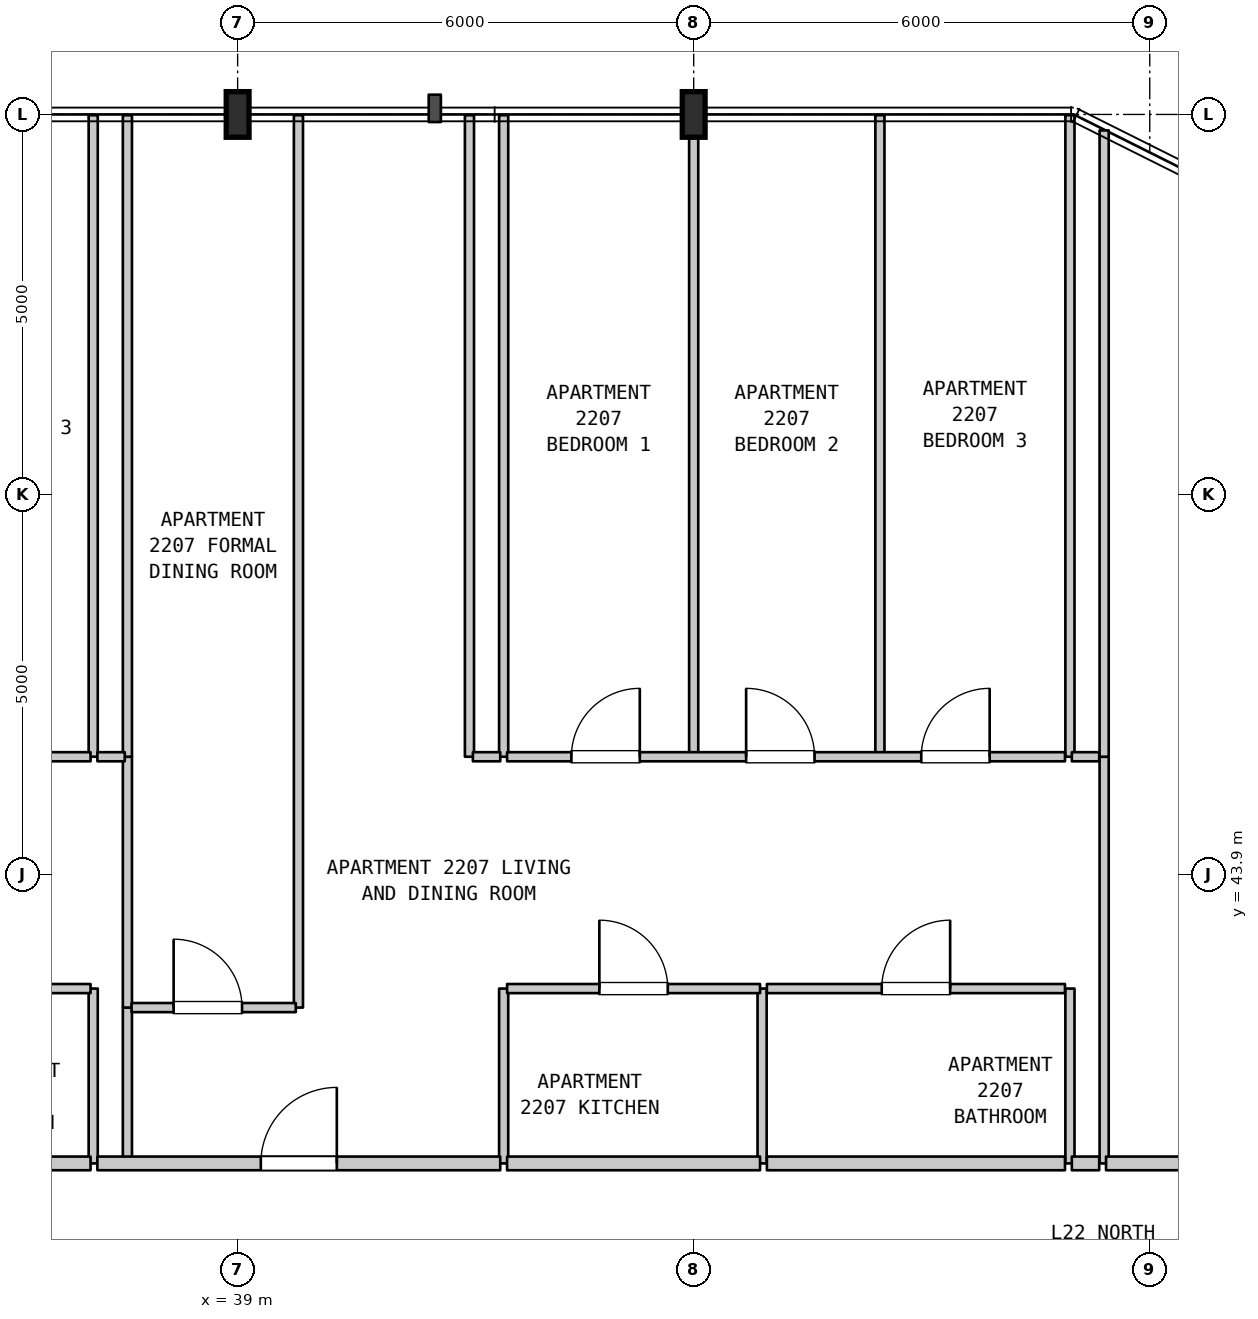
"""IFC4 building model, lengths in metres.
Left out: names, types, materials, properties, quantities, classifications, styles, units other than length and angle.
Written with IfcOpenShell. Run it as: python <this file> out.ifc"""

import sys

from ifc_helpers import new_model, si_unit, direction, frame, frame_2d, origin, origin_2d, place, context, subcontext, project, spatial, rectangle, i_section, extrude, element, fill, save


model = new_model("IFC4")
c1 = context("Model", 3, precision=1e-05, world=origin(), true_north=direction((0.0, 1.0)))
c2 = subcontext(c1, "Body", "Model", "MODEL_VIEW")
j1 = project(units=[si_unit("LENGTHUNIT", "METRE"), si_unit("PLANEANGLEUNIT", "RADIAN")], contexts=[c1])
p1 = place(None, origin())
s1 = spatial("IfcSite", under=j1, at=p1, CompositionType="ELEMENT")
p2 = place(p1, origin())
s2 = spatial("IfcBuilding", under=s1, at=p2, CompositionType="ELEMENT")
p3 = place(p2, frame((0.0, 0.0, 94.6)))
s3 = spatial("IfcBuildingStorey", under=s2, at=p3, CompositionType="ELEMENT", Elevation=94.6)
for number, where, z_axis, x_axis in (
    (1, (39.0, 53.9, 0.0), (0.0, 0.0, 1.0), (1.0, 0.0, 0.0)),
    (2, (45.0, 53.9, 0.0), (0.0, 0.0, 1.0), (1.0, 0.0, 0.0)),
):
    element("IfcColumn", number, at=place(p3, frame(where, z_axis=z_axis, x_axis=x_axis)), inside=s3, PredefinedType="COLUMN", context=c2, shape_type="SweptSolid", body=[
        extrude(i_section(OverallWidth=0.3, OverallDepth=0.6, WebThickness=0.015, FlangeThickness=0.03, FilletRadius=0.027, at=origin_2d()), origin(), (0.0, 0.0, 1.0), 3.7),
    ])
p4 = place(p3, frame((37.1, 40.1, 0.0), z_axis=(0.0, 0.0, 1.0), x_axis=(0.0, 1.0, 0.0)))
e3 = element("IfcWall", 3, at=p4, inside=s3, PredefinedType="PARTITIONING", context=c2, shape_type="SweptSolid", body=[
    extrude(rectangle(XDim=2.3, YDim=0.12, at=frame_2d((1.15, 0.0))), origin(), (0.0, 0.0, 1.0), 3.385),
])
p5 = place(p3, frame((37.1, 45.45, 0.0), z_axis=(0.0, 0.0, 1.0), x_axis=(0.0, 1.0, 0.0)))
e4 = element("IfcWall", 4, at=p5, inside=s3, PredefinedType="PARTITIONING", context=c2, shape_type="SweptSolid", body=[
    extrude(rectangle(XDim=8.44, YDim=0.12, at=frame_2d((4.22, 0.0))), origin(), (0.0, 0.0, 1.0), 3.385),
])
p6 = place(p3, frame((37.55, 40.1, 0.0), z_axis=(0.0, 0.0, 1.0), x_axis=(0.0, 1.0, 0.0)))
e5 = element("IfcWall", 5, at=p6, inside=s3, PredefinedType="PARTITIONING", context=c2, shape_type="SweptSolid", body=[
    extrude(rectangle(XDim=2.05, YDim=0.12, at=frame_2d((1.025, 0.0))), origin(), (0.0, 0.0, 1.0), 3.385),
])
p7 = place(p3, frame((37.55, 42.15, 0.0), z_axis=(0.0, 0.0, 1.0), x_axis=(0.0, 1.0, 0.0)))
e6 = element("IfcWall", 6, at=p7, inside=s3, PredefinedType="PARTITIONING", context=c2, shape_type="SweptSolid", body=[
    extrude(rectangle(XDim=3.3, YDim=0.12, at=frame_2d((1.65, 0.0))), origin(), (0.0, 0.0, 1.0), 3.385),
])
p8 = place(p3, frame((37.55, 45.45, 0.0), z_axis=(0.0, 0.0, 1.0), x_axis=(0.0, 1.0, 0.0)))
e7 = element("IfcWall", 7, at=p8, inside=s3, PredefinedType="PARTITIONING", context=c2, shape_type="SweptSolid", body=[
    extrude(rectangle(XDim=8.44, YDim=0.12, at=frame_2d((4.22, 0.0))), origin(), (0.0, 0.0, 1.0), 3.385),
])
p9 = place(p3, frame((39.8, 42.15, 0.0), z_axis=(0.0, 0.0, 1.0), x_axis=(0.0, 1.0, 0.0)))
e8 = element("IfcWall", 8, at=p9, inside=s3, PredefinedType="PARTITIONING", context=c2, shape_type="SweptSolid", body=[
    extrude(rectangle(XDim=11.74, YDim=0.12, at=frame_2d((5.87, 0.0))), origin(), (0.0, 0.0, 1.0), 3.385),
])
p10 = place(p3, frame((42.05, 45.45, 0.0), z_axis=(0.0, 0.0, 1.0), x_axis=(0.0, 1.0, 0.0)))
e9 = element("IfcWall", 9, at=p10, inside=s3, PredefinedType="PARTITIONING", context=c2, shape_type="SweptSolid", body=[
    extrude(rectangle(XDim=8.44, YDim=0.12, at=frame_2d((4.22, 0.0))), origin(), (0.0, 0.0, 1.0), 3.385),
])
p11 = place(p3, frame((42.5, 40.1, 0.0), z_axis=(0.0, 0.0, 1.0), x_axis=(0.0, 1.0, 0.0)))
e10 = element("IfcWall", 10, at=p11, inside=s3, PredefinedType="PARTITIONING", context=c2, shape_type="SweptSolid", body=[
    extrude(rectangle(XDim=2.3, YDim=0.12, at=frame_2d((1.15, 0.0))), origin(), (0.0, 0.0, 1.0), 3.385),
])
for number, where, z_axis, x_axis in (
    (11, (42.5, 45.45, 0.0), (0.0, 0.0, 1.0), (0.0, 1.0, 0.0)),
    (12, (45.0, 45.45, 0.0), (0.0, 0.0, 1.0), (0.0, 1.0, 0.0)),
):
    element("IfcWall", number, at=place(p3, frame(where, z_axis=z_axis, x_axis=x_axis)), inside=s3, PredefinedType="PARTITIONING", context=c2, shape_type="SweptSolid", body=[
        extrude(rectangle(XDim=8.44, YDim=0.12, at=frame_2d((4.22, 0.0))), origin(), (0.0, 0.0, 1.0), 3.385),
    ])
p12 = place(p3, frame((45.9, 40.1, 0.0), z_axis=(0.0, 0.0, 1.0), x_axis=(0.0, 1.0, 0.0)))
e13 = element("IfcWall", 13, at=p12, inside=s3, PredefinedType="PARTITIONING", context=c2, shape_type="SweptSolid", body=[
    extrude(rectangle(XDim=2.3, YDim=0.12, at=frame_2d((1.15, 0.0))), origin(), (0.0, 0.0, 1.0), 3.385),
])
p13 = place(p3, frame((47.45, 45.45, 0.0), z_axis=(0.0, 0.0, 1.0), x_axis=(0.0, 1.0, 0.0)))
e14 = element("IfcWall", 14, at=p13, inside=s3, PredefinedType="PARTITIONING", context=c2, shape_type="SweptSolid", body=[
    extrude(rectangle(XDim=8.44, YDim=0.12, at=frame_2d((4.22, 0.0))), origin(), (0.0, 0.0, 1.0), 3.385),
])
p14 = place(p3, frame((49.95, 40.1, 0.0), z_axis=(0.0, 0.0, 1.0), x_axis=(0.0, 1.0, 0.0)))
e15 = element("IfcWall", 15, at=p14, inside=s3, PredefinedType="PARTITIONING", context=c2, shape_type="SweptSolid", body=[
    extrude(rectangle(XDim=2.3, YDim=0.12, at=frame_2d((1.15, 0.0))), origin(), (0.0, 0.0, 1.0), 3.385),
])
p15 = place(p3, frame((49.95, 45.45, 0.0), z_axis=(0.0, 0.0, 1.0), x_axis=(0.0, 1.0, 0.0)))
e16 = element("IfcWall", 16, at=p15, inside=s3, PredefinedType="PARTITIONING", context=c2, shape_type="SweptSolid", body=[
    extrude(rectangle(XDim=8.44, YDim=0.12, at=frame_2d((4.22, 0.0))), origin(), (0.0, 0.0, 1.0), 3.385),
])
p16 = place(p3, frame((50.4, 40.1, 0.0), z_axis=(0.0, 0.0, 1.0), x_axis=(0.0, 1.0, 0.0)))
e17 = element("IfcWall", 17, at=p16, inside=s3, PredefinedType="PARTITIONING", context=c2, shape_type="SweptSolid", body=[
    extrude(rectangle(XDim=5.35, YDim=0.12, at=frame_2d((2.675, 0.0))), origin(), (0.0, 0.0, 1.0), 3.385),
])
p17 = place(p3, frame((50.4, 45.45, 0.0), z_axis=(0.0, 0.0, 1.0), x_axis=(0.0, 1.0, 0.0)))
e18 = element("IfcWall", 18, at=p17, inside=s3, PredefinedType="PARTITIONING", context=c2, shape_type="SweptSolid", body=[
    extrude(rectangle(XDim=8.24, YDim=0.12, at=frame_2d((4.12, 0.0))), origin(), (0.0, 0.0, 1.0), 3.385),
])
p18 = place(p3, frame((34.873, 40.1, 0.0), z_axis=(0.0, 0.0, 1.0), x_axis=(1.0, 0.0, 0.0)))
e19 = element("IfcWall", 19, at=p18, inside=s3, PredefinedType="STANDARD", context=c2, shape_type="SweptSolid", body=[
    extrude(rectangle(XDim=2.192, YDim=0.18, at=frame_2d((1.096, 0.0))), origin(), (0.0, 0.0, 1.0), 3.385),
])
p19 = place(p3, frame((37.155, 40.1, 0.0), z_axis=(0.0, 0.0, 1.0), x_axis=(1.0, 0.0, 0.0)))
e20 = element("IfcWall", 20, at=p19, inside=s3, PredefinedType="STANDARD", context=c2, shape_type="SweptSolid", body=[
    extrude(rectangle(XDim=5.3, YDim=0.18, at=frame_2d((2.65, 0.0))), origin(), (0.0, 0.0, 1.0), 3.385),
])
p20 = place(p19, frame((2.15, 0.0, 0.0)))
e21 = element("IfcOpeningElement", 21, at=p20, cuts=e20, PredefinedType="OPENING", context=c2, shape_type="SweptSolid", body=[
    extrude(rectangle(XDim=1.0, YDim=2.15, at=frame_2d((0.5, 1.075))), frame((0.0, 0.1, 0.0), z_axis=(0.0, -1.0, 0.0), x_axis=(1.0, 0.0, 0.0)), (0.0, 0.0, 1.0), 0.2),
])
p21 = place(p3, frame((42.545, 40.1, 0.0), z_axis=(0.0, 0.0, 1.0), x_axis=(1.0, 0.0, 0.0)))
e22 = element("IfcWall", 22, at=p21, inside=s3, PredefinedType="STANDARD", context=c2, shape_type="SweptSolid", body=[
    extrude(rectangle(XDim=3.328, YDim=0.18, at=frame_2d((1.664, 0.0))), origin(), (0.0, 0.0, 1.0), 3.385),
])
p22 = place(p3, frame((45.963, 40.1, 0.0), z_axis=(0.0, 0.0, 1.0), x_axis=(1.0, 0.0, 0.0)))
e23 = element("IfcWall", 23, at=p22, inside=s3, PredefinedType="STANDARD", context=c2, shape_type="SweptSolid", body=[
    extrude(rectangle(XDim=3.922, YDim=0.18, at=frame_2d((1.961, 0.0))), origin(), (0.0, 0.0, 1.0), 3.385),
])
p23 = place(p3, frame((49.975, 40.1, 0.0), z_axis=(0.0, 0.0, 1.0), x_axis=(1.0, 0.0, 0.0)))
e24 = element("IfcWall", 24, at=p23, inside=s3, PredefinedType="STANDARD", context=c2, shape_type="SweptSolid", body=[
    extrude(rectangle(XDim=0.36, YDim=0.18, at=frame_2d((0.18, 0.0))), origin(), (0.0, 0.0, 1.0), 3.385),
])
p24 = place(p3, frame((50.425, 40.1, 0.0), z_axis=(0.0, 0.0, 1.0), x_axis=(1.0, 0.0, 0.0)))
e25 = element("IfcWall", 25, at=p24, inside=s3, PredefinedType="STANDARD", context=c2, shape_type="SweptSolid", body=[
    extrude(rectangle(XDim=4.03, YDim=0.18, at=frame_2d((2.015, 0.0))), origin(), (0.0, 0.0, 1.0), 3.385),
])
p25 = place(p24, frame((1.515, 0.0, 0.0)))
e26 = element("IfcOpeningElement", 26, at=p25, cuts=e25, PredefinedType="OPENING", context=c2, shape_type="SweptSolid", body=[
    extrude(rectangle(XDim=1.0, YDim=2.15, at=frame_2d((0.5, 1.075))), frame((0.0, 0.1, 0.0), z_axis=(0.0, -1.0, 0.0), x_axis=(1.0, 0.0, 0.0)), (0.0, 0.0, 1.0), 0.2),
])
p26 = place(p3, frame((37.605, 42.15, 0.0), z_axis=(0.0, 0.0, 1.0), x_axis=(1.0, 0.0, 0.0)))
e27 = element("IfcWall", 27, at=p26, inside=s3, PredefinedType="PARTITIONING", context=c2, shape_type="SweptSolid", body=[
    extrude(rectangle(XDim=2.16, YDim=0.12, at=frame_2d((1.08, 0.0))), origin(), (0.0, 0.0, 1.0), 3.385),
])
p27 = place(p26, frame((0.553, 0.0, 0.0)))
e28 = element("IfcOpeningElement", 28, at=p27, cuts=e27, PredefinedType="OPENING", context=c2, shape_type="SweptSolid", body=[
    extrude(rectangle(XDim=0.9, YDim=2.15, at=frame_2d((0.45, 1.075))), frame((0.0, 0.07, 0.0), z_axis=(0.0, -1.0, 0.0), x_axis=(1.0, 0.0, 0.0)), (0.0, 0.0, 1.0), 0.14),
])
p28 = place(p3, frame((34.873, 42.4, 0.0), z_axis=(0.0, 0.0, 1.0), x_axis=(1.0, 0.0, 0.0)))
e29 = element("IfcWall", 29, at=p28, inside=s3, PredefinedType="PARTITIONING", context=c2, shape_type="SweptSolid", body=[
    extrude(rectangle(XDim=2.192, YDim=0.12, at=frame_2d((1.096, 0.0))), origin(), (0.0, 0.0, 1.0), 3.385),
])
p29 = place(p28, frame((0.646, 0.0, 0.0)))
e30 = element("IfcOpeningElement", 30, at=p29, cuts=e29, PredefinedType="OPENING", context=c2, shape_type="SweptSolid", body=[
    extrude(rectangle(XDim=0.9, YDim=2.1, at=frame_2d((0.45, 1.05))), frame((0.0, 0.07, 0.0), z_axis=(0.0, -1.0, 0.0), x_axis=(1.0, 0.0, 0.0)), (0.0, 0.0, 1.0), 0.14),
])
p30 = place(p3, frame((42.545, 42.4, 0.0), z_axis=(0.0, 0.0, 1.0), x_axis=(1.0, 0.0, 0.0)))
e31 = element("IfcWall", 31, at=p30, inside=s3, PredefinedType="PARTITIONING", context=c2, shape_type="SweptSolid", body=[
    extrude(rectangle(XDim=3.328, YDim=0.12, at=frame_2d((1.664, 0.0))), origin(), (0.0, 0.0, 1.0), 3.385),
])
p31 = place(p30, frame((1.214, 0.0, 0.0)))
e32 = element("IfcOpeningElement", 32, at=p31, cuts=e31, PredefinedType="OPENING", context=c2, shape_type="SweptSolid", body=[
    extrude(rectangle(XDim=0.9, YDim=2.15, at=frame_2d((0.45, 1.075))), frame((0.0, 0.07, 0.0), z_axis=(0.0, -1.0, 0.0), x_axis=(1.0, 0.0, 0.0)), (0.0, 0.0, 1.0), 0.14),
])
p32 = place(p3, frame((45.963, 42.4, 0.0), z_axis=(0.0, 0.0, 1.0), x_axis=(1.0, 0.0, 0.0)))
e33 = element("IfcWall", 33, at=p32, inside=s3, PredefinedType="PARTITIONING", context=c2, shape_type="SweptSolid", body=[
    extrude(rectangle(XDim=3.922, YDim=0.12, at=frame_2d((1.961, 0.0))), origin(), (0.0, 0.0, 1.0), 3.385),
])
p33 = place(p32, frame((1.511, 0.0, 0.0)))
e34 = element("IfcOpeningElement", 34, at=p33, cuts=e33, PredefinedType="OPENING", context=c2, shape_type="SweptSolid", body=[
    extrude(rectangle(XDim=0.9, YDim=2.1, at=frame_2d((0.45, 1.05))), frame((0.0, 0.07, 0.0), z_axis=(0.0, -1.0, 0.0), x_axis=(1.0, 0.0, 0.0)), (0.0, 0.0, 1.0), 0.14),
])
p34 = place(p3, frame((29.005, 45.45, 0.0), z_axis=(0.0, 0.0, 1.0), x_axis=(1.0, 0.0, 0.0)))
e35 = element("IfcWall", 35, at=p34, inside=s3, PredefinedType="PARTITIONING", context=c2, shape_type="SweptSolid", body=[
    extrude(rectangle(XDim=8.06, YDim=0.12, at=frame_2d((4.03, 0.0))), origin(), (0.0, 0.0, 1.0), 3.385),
])
p35 = place(p34, frame((0.968, 0.0, 0.0)))
e36 = element("IfcOpeningElement", 36, at=p35, cuts=e35, PredefinedType="OPENING", context=c2, shape_type="SweptSolid", body=[
    extrude(rectangle(XDim=0.9, YDim=2.15, at=frame_2d((0.45, 1.075))), frame((0.0, 0.07, 0.0), z_axis=(0.0, -1.0, 0.0), x_axis=(1.0, 0.0, 0.0)), (0.0, 0.0, 1.0), 0.14),
])
p36 = place(p34, frame((3.507, 0.0, 0.0)))
e37 = element("IfcOpeningElement", 37, at=p36, cuts=e35, PredefinedType="OPENING", context=c2, shape_type="SweptSolid", body=[
    extrude(rectangle(XDim=0.9, YDim=2.15, at=frame_2d((0.45, 1.075))), frame((0.0, 0.07, 0.0), z_axis=(0.0, -1.0, 0.0), x_axis=(1.0, 0.0, 0.0)), (0.0, 0.0, 1.0), 0.14),
])
p37 = place(p34, frame((6.051, 0.0, 0.0)))
e38 = element("IfcOpeningElement", 38, at=p37, cuts=e35, PredefinedType="OPENING", context=c2, shape_type="SweptSolid", body=[
    extrude(rectangle(XDim=0.9, YDim=2.15, at=frame_2d((0.45, 1.075))), frame((0.0, 0.07, 0.0), z_axis=(0.0, -1.0, 0.0), x_axis=(1.0, 0.0, 0.0)), (0.0, 0.0, 1.0), 0.14),
])
p38 = place(p3, frame((37.155, 45.45, 0.0), z_axis=(0.0, 0.0, 1.0), x_axis=(1.0, 0.0, 0.0)))
e39 = element("IfcWall", 39, at=p38, inside=s3, PredefinedType="PARTITIONING", context=c2, shape_type="SweptSolid", body=[
    extrude(rectangle(XDim=0.36, YDim=0.12, at=frame_2d((0.18, 0.0))), origin(), (0.0, 0.0, 1.0), 3.385),
])
p39 = place(p3, frame((42.095, 45.45, 0.0), z_axis=(0.0, 0.0, 1.0), x_axis=(1.0, 0.0, 0.0)))
e40 = element("IfcWall", 40, at=p39, inside=s3, PredefinedType="PARTITIONING", context=c2, shape_type="SweptSolid", body=[
    extrude(rectangle(XDim=0.36, YDim=0.12, at=frame_2d((0.18, 0.0))), origin(), (0.0, 0.0, 1.0), 3.385),
])
p40 = place(p3, frame((42.545, 45.45, 0.0), z_axis=(0.0, 0.0, 1.0), x_axis=(1.0, 0.0, 0.0)))
e41 = element("IfcWall", 41, at=p40, inside=s3, PredefinedType="PARTITIONING", context=c2, shape_type="SweptSolid", body=[
    extrude(rectangle(XDim=7.34, YDim=0.12, at=frame_2d((3.67, 0.0))), origin(), (0.0, 0.0, 1.0), 3.385),
])
p41 = place(p40, frame((0.846, 0.0, 0.0)))
e42 = element("IfcOpeningElement", 42, at=p41, cuts=e41, PredefinedType="OPENING", context=c2, shape_type="SweptSolid", body=[
    extrude(rectangle(XDim=0.9, YDim=2.15, at=frame_2d((0.45, 1.075))), frame((0.0, 0.07, 0.0), z_axis=(0.0, -1.0, 0.0), x_axis=(1.0, 0.0, 0.0)), (0.0, 0.0, 1.0), 0.14),
])
p42 = place(p40, frame((3.145, 0.0, 0.0)))
e43 = element("IfcOpeningElement", 43, at=p42, cuts=e41, PredefinedType="OPENING", context=c2, shape_type="SweptSolid", body=[
    extrude(rectangle(XDim=0.9, YDim=2.15, at=frame_2d((0.45, 1.075))), frame((0.0, 0.07, 0.0), z_axis=(0.0, -1.0, 0.0), x_axis=(1.0, 0.0, 0.0)), (0.0, 0.0, 1.0), 0.14),
])
p43 = place(p40, frame((5.449, 0.0, 0.0)))
e44 = element("IfcOpeningElement", 44, at=p43, cuts=e41, PredefinedType="OPENING", context=c2, shape_type="SweptSolid", body=[
    extrude(rectangle(XDim=0.9, YDim=2.15, at=frame_2d((0.45, 1.075))), frame((0.0, 0.07, 0.0), z_axis=(0.0, -1.0, 0.0), x_axis=(1.0, 0.0, 0.0)), (0.0, 0.0, 1.0), 0.14),
])
p44 = place(p3, frame((49.975, 45.45, 0.0), z_axis=(0.0, 0.0, 1.0), x_axis=(1.0, 0.0, 0.0)))
e45 = element("IfcWall", 45, at=p44, inside=s3, PredefinedType="PARTITIONING", context=c2, shape_type="SweptSolid", body=[
    extrude(rectangle(XDim=0.36, YDim=0.12, at=frame_2d((0.18, 0.0))), origin(), (0.0, 0.0, 1.0), 3.385),
])
p45 = place(p20, origin())
e46 = element("IfcDoor", 46, at=p45, inside=s3, OperationType="SINGLE_SWING_RIGHT", PredefinedType="DOOR", context=c2, shape_type="SweptSolid", body=[
    extrude(rectangle(XDim=1.0, YDim=2.15, at=frame_2d((0.5, 1.075))), frame((0.0, 0.025, 0.0), z_axis=(0.0, -1.0, 0.0), x_axis=(1.0, 0.0, 0.0)), (0.0, 0.0, 1.0), 0.05),
])
fill(e21, e46)
p46 = place(p27, origin())
e47 = element("IfcDoor", 47, at=p46, inside=s3, OperationType="SINGLE_SWING_LEFT", PredefinedType="DOOR", context=c2, shape_type="SweptSolid", body=[
    extrude(rectangle(XDim=0.9, YDim=2.15, at=frame_2d((0.45, 1.075))), frame((0.0, 0.025, 0.0), z_axis=(0.0, -1.0, 0.0), x_axis=(1.0, 0.0, 0.0)), (0.0, 0.0, 1.0), 0.05),
])
fill(e28, e47)
p47 = place(p31, origin())
e48 = element("IfcDoor", 48, at=p47, inside=s3, OperationType="SINGLE_SWING_LEFT", PredefinedType="DOOR", context=c2, shape_type="SweptSolid", body=[
    extrude(rectangle(XDim=0.9, YDim=2.15, at=frame_2d((0.45, 1.075))), frame((0.0, 0.025, 0.0), z_axis=(0.0, -1.0, 0.0), x_axis=(1.0, 0.0, 0.0)), (0.0, 0.0, 1.0), 0.05),
])
fill(e32, e48)
p48 = place(p33, origin())
e49 = element("IfcDoor", 49, at=p48, inside=s3, OperationType="SINGLE_SWING_RIGHT", PredefinedType="DOOR", context=c2, shape_type="SweptSolid", body=[
    extrude(rectangle(XDim=0.9, YDim=2.1, at=frame_2d((0.45, 1.05))), frame((0.0, 0.025, 0.0), z_axis=(0.0, -1.0, 0.0), x_axis=(1.0, 0.0, 0.0)), (0.0, 0.0, 1.0), 0.05),
])
fill(e34, e49)
p49 = place(p41, origin())
e50 = element("IfcDoor", 50, at=p49, inside=s3, OperationType="SINGLE_SWING_RIGHT", PredefinedType="DOOR", context=c2, shape_type="SweptSolid", body=[
    extrude(rectangle(XDim=0.9, YDim=2.15, at=frame_2d((0.45, 1.075))), frame((0.0, 0.025, 0.0), z_axis=(0.0, -1.0, 0.0), x_axis=(1.0, 0.0, 0.0)), (0.0, 0.0, 1.0), 0.05),
])
fill(e42, e50)
p50 = place(p42, origin())
e51 = element("IfcDoor", 51, at=p50, inside=s3, OperationType="SINGLE_SWING_LEFT", PredefinedType="DOOR", context=c2, shape_type="SweptSolid", body=[
    extrude(rectangle(XDim=0.9, YDim=2.15, at=frame_2d((0.45, 1.075))), frame((0.0, 0.025, 0.0), z_axis=(0.0, -1.0, 0.0), x_axis=(1.0, 0.0, 0.0)), (0.0, 0.0, 1.0), 0.05),
])
fill(e43, e51)
p51 = place(p43, origin())
e52 = element("IfcDoor", 52, at=p51, inside=s3, OperationType="SINGLE_SWING_RIGHT", PredefinedType="DOOR", context=c2, shape_type="SweptSolid", body=[
    extrude(rectangle(XDim=0.9, YDim=2.15, at=frame_2d((0.45, 1.075))), frame((0.0, 0.025, 0.0), z_axis=(0.0, -1.0, 0.0), x_axis=(1.0, 0.0, 0.0)), (0.0, 0.0, 1.0), 0.05),
])
fill(e44, e52)
save(model, sys.argv[1])
